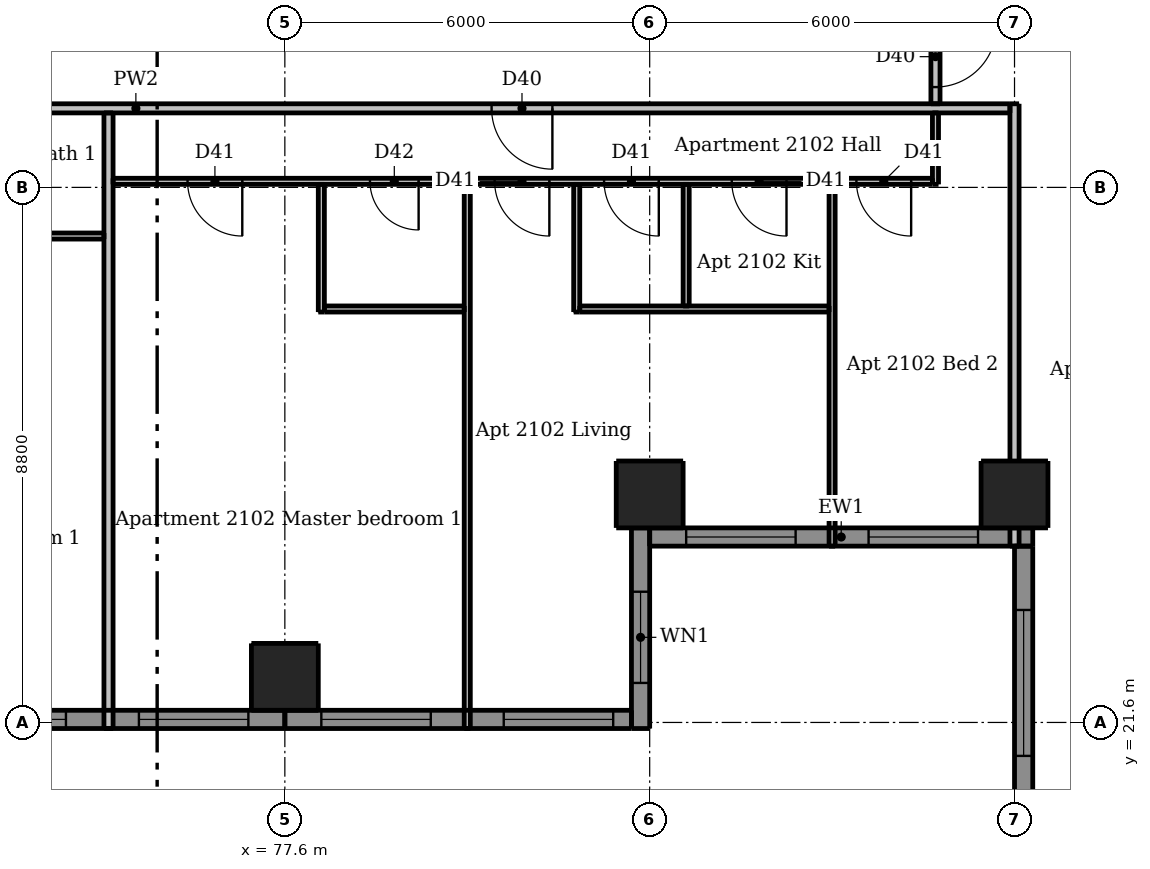
"""IFC4 building model, lengths in metres.
Left out: names, types, materials, properties, quantities, classifications, styles, units other than length and angle.
Written with IfcOpenShell. Run it as: python <this file> out.ifc"""

import sys

from ifc_helpers import new_model, si_unit, direction, frame, frame_2d, origin, origin_2d, place, context, subcontext, project, spatial, rectangle, extrude, element, fill, save


model = new_model("IFC4")
c1 = context("Model", 3, precision=1e-05, world=origin(), true_north=direction((0.0, 1.0)))
c2 = subcontext(c1, "Body", "Model", "MODEL_VIEW")
j1 = project(units=[si_unit("LENGTHUNIT", "METRE"), si_unit("PLANEANGLEUNIT", "RADIAN")], contexts=[c1])
p1 = place(None, origin())
s1 = spatial("IfcSite", under=j1, at=p1, CompositionType="ELEMENT")
p2 = place(p1, origin())
s2 = spatial("IfcBuilding", under=s1, at=p2, CompositionType="ELEMENT")
p3 = place(p2, frame((0.0, 0.0, 82.0)))
s3 = spatial("IfcBuildingStorey", under=s2, at=p3, CompositionType="ELEMENT", Elevation=82.0)
for number, where, z_axis, x_axis in (
    (1, (77.6, 22.35, 0.0), (0.0, 0.0, 1.0), (1.0, 0.0, 0.0)),
    (2, (83.6, 25.35, 0.0), (0.0, 0.0, 1.0), (1.0, 0.0, 0.0)),
    (3, (89.6, 25.35, 0.0), (0.0, 0.0, 1.0), (1.0, 0.0, 0.0)),
):
    element("IfcColumn", number, at=place(p3, frame(where, z_axis=z_axis, x_axis=x_axis)), inside=s3, PredefinedType="COLUMN", context=c2, shape_type="SweptSolid", body=[
        extrude(rectangle(XDim=1.1, YDim=1.1, at=origin_2d()), origin(), (0.0, 0.0, 1.0), 3.05),
    ])
p4 = place(p3, frame((83.45, 21.5, 0.0), z_axis=(0.0, 0.0, 1.0), x_axis=(0.0, 1.0, 0.0)))
e4 = element("IfcWall", 4, at=p4, inside=s3, PredefinedType="SOLIDWALL", context=c2, shape_type="SweptSolid", body=[
    extrude(rectangle(XDim=3.3, YDim=0.3, at=frame_2d((1.65, 0.0))), origin(), (0.0, 0.0, 1.0), 3.05),
])
p5 = place(p4, frame((0.75, 0.0, 0.9)))
e5 = element("IfcOpeningElement", 5, at=p5, cuts=e4, PredefinedType="OPENING", context=c2, shape_type="SweptSolid", body=[
    extrude(rectangle(XDim=1.5, YDim=1.5, at=frame_2d((0.75, 0.75))), frame((0.0, 0.16, 0.0), z_axis=(0.0, -1.0, 0.0), x_axis=(1.0, 0.0, 0.0)), (0.0, 0.0, 1.0), 0.32),
])
p6 = place(p3, frame((89.75, 24.5, 0.0), z_axis=(0.0, 0.0, 1.0), x_axis=(0.0, -1.0, 0.0)))
e6 = element("IfcWall", 6, at=p6, inside=s3, PredefinedType="SOLIDWALL", context=c2, shape_type="SweptSolid", body=[
    extrude(rectangle(XDim=4.5, YDim=0.3, at=frame_2d((2.25, 0.0))), origin(), (0.0, 0.0, 1.0), 3.05),
])
p7 = place(p6, frame((1.05, 0.0, 0.15)))
e7 = element("IfcOpeningElement", 7, at=p7, cuts=e6, PredefinedType="OPENING", context=c2, shape_type="SweptSolid", body=[
    extrude(rectangle(XDim=2.4, YDim=2.1, at=frame_2d((1.2, 1.05))), frame((0.0, 0.16, 0.0), z_axis=(0.0, -1.0, 0.0), x_axis=(1.0, 0.0, 0.0)), (0.0, 0.0, 1.0), 0.32),
])
p8 = place(p3, frame((71.6, 21.65, 0.0), z_axis=(0.0, 0.0, 1.0), x_axis=(1.0, 0.0, 0.0)))
e8 = element("IfcWall", 8, at=p8, inside=s3, PredefinedType="SOLIDWALL", context=c2, shape_type="SweptSolid", body=[
    extrude(rectangle(XDim=6.0, YDim=0.3, at=frame_2d((3.0, 0.0))), origin(), (0.0, 0.0, 1.0), 3.05),
])
p9 = place(p8, frame((0.6, 0.0, 0.15)))
e9 = element("IfcOpeningElement", 9, at=p9, cuts=e8, PredefinedType="OPENING", context=c2, shape_type="SweptSolid", body=[
    extrude(rectangle(XDim=1.8, YDim=2.1, at=frame_2d((0.9, 1.05))), frame((0.0, 0.16, 0.0), z_axis=(0.0, -1.0, 0.0), x_axis=(1.0, 0.0, 0.0)), (0.0, 0.0, 1.0), 0.32),
])
p10 = place(p8, frame((3.6, 0.0, 0.15)))
e10 = element("IfcOpeningElement", 10, at=p10, cuts=e8, PredefinedType="OPENING", context=c2, shape_type="SweptSolid", body=[
    extrude(rectangle(XDim=1.8, YDim=2.1, at=frame_2d((0.9, 1.05))), frame((0.0, 0.16, 0.0), z_axis=(0.0, -1.0, 0.0), x_axis=(1.0, 0.0, 0.0)), (0.0, 0.0, 1.0), 0.32),
])
p11 = place(p3, frame((77.6, 21.65, 0.0), z_axis=(0.0, 0.0, 1.0), x_axis=(1.0, 0.0, 0.0)))
e11 = element("IfcWall", 11, at=p11, inside=s3, PredefinedType="SOLIDWALL", context=c2, shape_type="SweptSolid", body=[
    extrude(rectangle(XDim=5.7, YDim=0.3, at=frame_2d((2.85, 0.0))), origin(), (0.0, 0.0, 1.0), 3.05),
])
p12 = place(p11, frame((0.6, 0.0, 0.15)))
e12 = element("IfcOpeningElement", 12, at=p12, cuts=e11, PredefinedType="OPENING", context=c2, shape_type="SweptSolid", body=[
    extrude(rectangle(XDim=1.8, YDim=2.1, at=frame_2d((0.9, 1.05))), frame((0.0, 0.16, 0.0), z_axis=(0.0, -1.0, 0.0), x_axis=(1.0, 0.0, 0.0)), (0.0, 0.0, 1.0), 0.32),
])
p13 = place(p11, frame((3.6, 0.0, 0.15)))
e13 = element("IfcOpeningElement", 13, at=p13, cuts=e11, PredefinedType="OPENING", context=c2, shape_type="SweptSolid", body=[
    extrude(rectangle(XDim=1.8, YDim=2.1, at=frame_2d((0.9, 1.05))), frame((0.0, 0.16, 0.0), z_axis=(0.0, -1.0, 0.0), x_axis=(1.0, 0.0, 0.0)), (0.0, 0.0, 1.0), 0.32),
])
p14 = place(p3, frame((83.6, 24.65, 0.0), z_axis=(0.0, 0.0, 1.0), x_axis=(1.0, 0.0, 0.0)))
e14 = element("IfcWall", 14, at=p14, inside=s3, PredefinedType="SOLIDWALL", context=c2, shape_type="SweptSolid", body=[
    extrude(rectangle(XDim=6.3, YDim=0.3, at=frame_2d((3.15, 0.0))), origin(), (0.0, 0.0, 1.0), 3.05),
])
p15 = place(p14, frame((0.6, 0.0, 0.15)))
e15 = element("IfcOpeningElement", 15, at=p15, cuts=e14, PredefinedType="OPENING", context=c2, shape_type="SweptSolid", body=[
    extrude(rectangle(XDim=1.8, YDim=2.1, at=frame_2d((0.9, 1.05))), frame((0.0, 0.16, 0.0), z_axis=(0.0, -1.0, 0.0), x_axis=(1.0, 0.0, 0.0)), (0.0, 0.0, 1.0), 0.32),
])
p16 = place(p14, frame((3.6, 0.0, 0.15)))
e16 = element("IfcOpeningElement", 16, at=p16, cuts=e14, PredefinedType="OPENING", context=c2, shape_type="SweptSolid", body=[
    extrude(rectangle(XDim=1.8, YDim=2.1, at=frame_2d((0.9, 1.05))), frame((0.0, 0.16, 0.0), z_axis=(0.0, -1.0, 0.0), x_axis=(1.0, 0.0, 0.0)), (0.0, 0.0, 1.0), 0.32),
])
p17 = place(p3, frame((78.2, 28.35, 0.0), z_axis=(0.0, 0.0, 1.0), x_axis=(0.0, 1.0, 0.0)))
e17 = element("IfcWall", 17, at=p17, inside=s3, PredefinedType="PARTITIONING", context=c2, shape_type="SweptSolid", body=[
    extrude(rectangle(XDim=2.1, YDim=0.1, at=frame_2d((1.05, 0.0))), origin(), (0.0, 0.0, 1.0), 3.05),
])
p18 = place(p3, frame((80.6, 21.5, 0.0), z_axis=(0.0, 0.0, 1.0), x_axis=(0.0, 1.0, 0.0)))
e18 = element("IfcWall", 18, at=p18, inside=s3, PredefinedType="PARTITIONING", context=c2, shape_type="SweptSolid", body=[
    extrude(rectangle(XDim=8.95, YDim=0.1, at=frame_2d((4.475, 0.0))), origin(), (0.0, 0.0, 1.0), 3.05),
])
p19 = place(p3, frame((82.4, 28.35, 0.0), z_axis=(0.0, 0.0, 1.0), x_axis=(0.0, 1.0, 0.0)))
e19 = element("IfcWall", 19, at=p19, inside=s3, PredefinedType="PARTITIONING", context=c2, shape_type="SweptSolid", body=[
    extrude(rectangle(XDim=2.1, YDim=0.1, at=frame_2d((1.05, 0.0))), origin(), (0.0, 0.0, 1.0), 3.05),
])
p20 = place(p3, frame((84.2, 28.45, 0.0), z_axis=(0.0, 0.0, 1.0), x_axis=(0.0, 1.0, 0.0)))
e20 = element("IfcWall", 20, at=p20, inside=s3, PredefinedType="PARTITIONING", context=c2, shape_type="SweptSolid", body=[
    extrude(rectangle(XDim=2.0, YDim=0.1, at=frame_2d((1.0, 0.0))), origin(), (0.0, 0.0, 1.0), 3.05),
])
p21 = place(p3, frame((86.6, 24.5, 0.0), z_axis=(0.0, 0.0, 1.0), x_axis=(0.0, 1.0, 0.0)))
e21 = element("IfcWall", 21, at=p21, inside=s3, PredefinedType="PARTITIONING", context=c2, shape_type="SweptSolid", body=[
    extrude(rectangle(XDim=5.95, YDim=0.1, at=frame_2d((2.975, 0.0))), origin(), (0.0, 0.0, 1.0), 3.05),
])
p22 = place(p3, frame((88.3, 30.45, 0.0), z_axis=(0.0, 0.0, 1.0), x_axis=(0.0, 1.0, 0.0)))
e22 = element("IfcWall", 22, at=p22, inside=s3, PredefinedType="PARTITIONING", context=c2, shape_type="SweptSolid", body=[
    extrude(rectangle(XDim=1.175, YDim=0.1, at=frame_2d((0.587, 0.0))), origin(), (0.0, 0.0, 1.0), 3.05),
])
p23 = place(p3, frame((88.25, 30.5, 0.0), z_axis=(0.0, 0.0, 1.0), x_axis=(-1.0, 0.0, 0.0)))
e23 = element("IfcWall", 23, at=p23, inside=s3, PredefinedType="PARTITIONING", context=c2, shape_type="SweptSolid", body=[
    extrude(rectangle(XDim=13.475, YDim=0.1, at=frame_2d((6.738, 0.0))), origin(), (0.0, 0.0, 1.0), 3.05),
])
p24 = place(p23, frame((6.3, 0.0, 0.0)))
e24 = element("IfcOpeningElement", 24, at=p24, cuts=e23, PredefinedType="OPENING", context=c2, shape_type="SweptSolid", body=[
    extrude(rectangle(XDim=0.9, YDim=2.1, at=frame_2d((0.45, 1.05))), frame((0.0, 0.06, 0.0), z_axis=(0.0, -1.0, 0.0), x_axis=(1.0, 0.0, 0.0)), (0.0, 0.0, 1.0), 0.12),
])
p25 = place(p23, frame((2.4, 0.0, 0.0)))
e25 = element("IfcOpeningElement", 25, at=p25, cuts=e23, PredefinedType="OPENING", context=c2, shape_type="SweptSolid", body=[
    extrude(rectangle(XDim=0.9, YDim=2.1, at=frame_2d((0.45, 1.05))), frame((0.0, 0.06, 0.0), z_axis=(0.0, -1.0, 0.0), x_axis=(1.0, 0.0, 0.0)), (0.0, 0.0, 1.0), 0.12),
])
p26 = place(p23, frame((4.5, 0.0, 0.0)))
e26 = element("IfcOpeningElement", 26, at=p26, cuts=e23, PredefinedType="OPENING", context=c2, shape_type="SweptSolid", body=[
    extrude(rectangle(XDim=0.9, YDim=2.1, at=frame_2d((0.45, 1.05))), frame((0.0, 0.06, 0.0), z_axis=(0.0, -1.0, 0.0), x_axis=(1.0, 0.0, 0.0)), (0.0, 0.0, 1.0), 0.12),
])
p27 = place(p23, frame((11.35, 0.0, 0.0)))
e27 = element("IfcOpeningElement", 27, at=p27, cuts=e23, PredefinedType="OPENING", context=c2, shape_type="SweptSolid", body=[
    extrude(rectangle(XDim=0.9, YDim=2.1, at=frame_2d((0.45, 1.05))), frame((0.0, 0.06, 0.0), z_axis=(0.0, -1.0, 0.0), x_axis=(1.0, 0.0, 0.0)), (0.0, 0.0, 1.0), 0.12),
])
p28 = place(p23, frame((0.35, 0.0, 0.0)))
e28 = element("IfcOpeningElement", 28, at=p28, cuts=e23, PredefinedType="OPENING", context=c2, shape_type="SweptSolid", body=[
    extrude(rectangle(XDim=0.9, YDim=2.1, at=frame_2d((0.45, 1.05))), frame((0.0, 0.06, 0.0), z_axis=(0.0, -1.0, 0.0), x_axis=(1.0, 0.0, 0.0)), (0.0, 0.0, 1.0), 0.12),
])
p29 = place(p23, frame((8.45, 0.0, 0.0)))
e29 = element("IfcOpeningElement", 29, at=p29, cuts=e23, PredefinedType="OPENING", context=c2, shape_type="SweptSolid", body=[
    extrude(rectangle(XDim=0.8, YDim=2.1, at=frame_2d((0.4, 1.05))), frame((0.0, 0.06, 0.0), z_axis=(0.0, -1.0, 0.0), x_axis=(1.0, 0.0, 0.0)), (0.0, 0.0, 1.0), 0.12),
])
p30 = place(p3, frame((68.15, 29.6, 0.0), z_axis=(0.0, 0.0, 1.0), x_axis=(1.0, 0.0, 0.0)))
e30 = element("IfcWall", 30, at=p30, inside=s3, PredefinedType="PARTITIONING", context=c2, shape_type="SweptSolid", body=[
    extrude(rectangle(XDim=6.475, YDim=0.1, at=frame_2d((3.238, 0.0))), origin(), (0.0, 0.0, 1.0), 3.05),
])
p31 = place(p30, frame((4.05, 0.0, 0.0)))
e31 = element("IfcOpeningElement", 31, at=p31, cuts=e30, PredefinedType="OPENING", context=c2, shape_type="SweptSolid", body=[
    extrude(rectangle(XDim=0.8, YDim=2.1, at=frame_2d((0.4, 1.05))), frame((0.0, 0.06, 0.0), z_axis=(0.0, -1.0, 0.0), x_axis=(1.0, 0.0, 0.0)), (0.0, 0.0, 1.0), 0.12),
])
p32 = place(p3, frame((78.25, 28.4, 0.0), z_axis=(0.0, 0.0, 1.0), x_axis=(1.0, 0.0, 0.0)))
e32 = element("IfcWall", 32, at=p32, inside=s3, PredefinedType="PARTITIONING", context=c2, shape_type="SweptSolid", body=[
    extrude(rectangle(XDim=2.3, YDim=0.1, at=frame_2d((1.15, 0.0))), origin(), (0.0, 0.0, 1.0), 3.05),
])
p33 = place(p3, frame((82.45, 28.4, 0.0), z_axis=(0.0, 0.0, 1.0), x_axis=(1.0, 0.0, 0.0)))
e33 = element("IfcWall", 33, at=p33, inside=s3, PredefinedType="PARTITIONING", context=c2, shape_type="SweptSolid", body=[
    extrude(rectangle(XDim=4.1, YDim=0.1, at=frame_2d((2.05, 0.0))), origin(), (0.0, 0.0, 1.0), 3.05),
])
p34 = place(p3, frame((74.7, 21.5, 0.0), z_axis=(0.0, 0.0, 1.0), x_axis=(0.0, 1.0, 0.0)))
e34 = element("IfcWall", 34, at=p34, inside=s3, PredefinedType="PARTITIONING", context=c2, shape_type="SweptSolid", body=[
    extrude(rectangle(XDim=10.125, YDim=0.15, at=frame_2d((5.062, 0.0))), origin(), (0.0, 0.0, 1.0), 3.05),
])
p35 = place(p3, frame((88.3, 60.475, 0.0), z_axis=(0.0, 0.0, 1.0), x_axis=(0.0, -1.0, 0.0)))
e35 = element("IfcWall", 35, at=p35, inside=s3, PredefinedType="PARTITIONING", context=c2, shape_type="SweptSolid", body=[
    extrude(rectangle(XDim=28.7, YDim=0.15, at=frame_2d((14.35, 0.0))), origin(), (0.0, 0.0, 1.0), 3.05),
])
p36 = place(p35, frame((27.425, 0.0, 0.0)))
e36 = element("IfcOpeningElement", 36, at=p36, cuts=e35, PredefinedType="OPENING", context=c2, shape_type="SweptSolid", body=[
    extrude(rectangle(XDim=1.0, YDim=2.1, at=frame_2d((0.5, 1.05))), frame((0.0, 0.085, 0.0), z_axis=(0.0, -1.0, 0.0), x_axis=(1.0, 0.0, 0.0)), (0.0, 0.0, 1.0), 0.17),
])
p37 = place(p35, frame((10.575, 0.0, 0.0)))
e37 = element("IfcOpeningElement", 37, at=p37, cuts=e35, PredefinedType="OPENING", context=c2, shape_type="SweptSolid", body=[
    extrude(rectangle(XDim=1.0, YDim=2.1, at=frame_2d((0.5, 1.05))), frame((0.0, 0.085, 0.0), z_axis=(0.0, -1.0, 0.0), x_axis=(1.0, 0.0, 0.0)), (0.0, 0.0, 1.0), 0.17),
])
p38 = place(p3, frame((89.6, 24.5, 0.0), z_axis=(0.0, 0.0, 1.0), x_axis=(0.0, 1.0, 0.0)))
e38 = element("IfcWall", 38, at=p38, inside=s3, PredefinedType="PARTITIONING", context=c2, shape_type="SweptSolid", body=[
    extrude(rectangle(XDim=7.275, YDim=0.15, at=frame_2d((3.637, 0.0))), origin(), (0.0, 0.0, 1.0), 2.516),
])
p39 = place(p3, frame((89.525, 31.7, 0.0), z_axis=(0.0, 0.0, 1.0), x_axis=(-1.0, 0.0, 0.0)))
e39 = element("IfcWall", 39, at=p39, inside=s3, PredefinedType="PARTITIONING", context=c2, shape_type="SweptSolid", body=[
    extrude(rectangle(XDim=28.75, YDim=0.15, at=frame_2d((14.375, 0.0))), origin(), (0.0, 0.0, 1.0), 3.05),
])
p40 = place(p39, frame((24.625, 0.0, 0.0)))
e40 = element("IfcOpeningElement", 40, at=p40, cuts=e39, PredefinedType="OPENING", context=c2, shape_type="SweptSolid", body=[
    extrude(rectangle(XDim=1.0, YDim=2.1, at=frame_2d((0.5, 1.05))), frame((0.0, 0.085, 0.0), z_axis=(0.0, -1.0, 0.0), x_axis=(1.0, 0.0, 0.0)), (0.0, 0.0, 1.0), 0.17),
])
p41 = place(p39, frame((7.525, 0.0, 0.0)))
e41 = element("IfcOpeningElement", 41, at=p41, cuts=e39, PredefinedType="OPENING", context=c2, shape_type="SweptSolid", body=[
    extrude(rectangle(XDim=1.0, YDim=2.1, at=frame_2d((0.5, 1.05))), frame((0.0, 0.085, 0.0), z_axis=(0.0, -1.0, 0.0), x_axis=(1.0, 0.0, 0.0)), (0.0, 0.0, 1.0), 0.17),
])
p42 = place(p5, origin())
e42 = element("IfcWindow", 42, at=p42, inside=s3, PartitioningType="DOUBLE_PANEL_VERTICAL", PredefinedType="WINDOW", context=c2, shape_type="SweptSolid", body=[
    extrude(rectangle(XDim=1.5, YDim=1.5, at=frame_2d((0.75, 0.75))), frame((0.0, 0.03, 0.0), z_axis=(0.0, -1.0, 0.0), x_axis=(1.0, 0.0, 0.0)), (0.0, 0.0, 1.0), 0.06),
])
fill(e5, e42)
p43 = place(p7, origin())
e43 = element("IfcWindow", 43, at=p43, inside=s3, PartitioningType="DOUBLE_PANEL_VERTICAL", PredefinedType="WINDOW", context=c2, shape_type="SweptSolid", body=[
    extrude(rectangle(XDim=2.4, YDim=2.1, at=frame_2d((1.2, 1.05))), frame((0.0, 0.03, 0.0), z_axis=(0.0, -1.0, 0.0), x_axis=(1.0, 0.0, 0.0)), (0.0, 0.0, 1.0), 0.06),
])
fill(e7, e43)
p44 = place(p9, origin())
e44 = element("IfcWindow", 44, at=p44, inside=s3, PartitioningType="DOUBLE_PANEL_VERTICAL", PredefinedType="WINDOW", context=c2, shape_type="SweptSolid", body=[
    extrude(rectangle(XDim=1.8, YDim=2.1, at=frame_2d((0.9, 1.05))), frame((0.0, 0.03, 0.0), z_axis=(0.0, -1.0, 0.0), x_axis=(1.0, 0.0, 0.0)), (0.0, 0.0, 1.0), 0.06),
])
fill(e9, e44)
p45 = place(p10, origin())
e45 = element("IfcWindow", 45, at=p45, inside=s3, PartitioningType="DOUBLE_PANEL_VERTICAL", PredefinedType="WINDOW", context=c2, shape_type="SweptSolid", body=[
    extrude(rectangle(XDim=1.8, YDim=2.1, at=frame_2d((0.9, 1.05))), frame((0.0, 0.03, 0.0), z_axis=(0.0, -1.0, 0.0), x_axis=(1.0, 0.0, 0.0)), (0.0, 0.0, 1.0), 0.06),
])
fill(e10, e45)
p46 = place(p12, origin())
e46 = element("IfcWindow", 46, at=p46, inside=s3, PartitioningType="DOUBLE_PANEL_VERTICAL", PredefinedType="WINDOW", context=c2, shape_type="SweptSolid", body=[
    extrude(rectangle(XDim=1.8, YDim=2.1, at=frame_2d((0.9, 1.05))), frame((0.0, 0.03, 0.0), z_axis=(0.0, -1.0, 0.0), x_axis=(1.0, 0.0, 0.0)), (0.0, 0.0, 1.0), 0.06),
])
fill(e12, e46)
p47 = place(p13, origin())
e47 = element("IfcWindow", 47, at=p47, inside=s3, PartitioningType="DOUBLE_PANEL_VERTICAL", PredefinedType="WINDOW", context=c2, shape_type="SweptSolid", body=[
    extrude(rectangle(XDim=1.8, YDim=2.1, at=frame_2d((0.9, 1.05))), frame((0.0, 0.03, 0.0), z_axis=(0.0, -1.0, 0.0), x_axis=(1.0, 0.0, 0.0)), (0.0, 0.0, 1.0), 0.06),
])
fill(e13, e47)
p48 = place(p15, origin())
e48 = element("IfcWindow", 48, at=p48, inside=s3, PartitioningType="DOUBLE_PANEL_VERTICAL", PredefinedType="WINDOW", context=c2, shape_type="SweptSolid", body=[
    extrude(rectangle(XDim=1.8, YDim=2.1, at=frame_2d((0.9, 1.05))), frame((0.0, 0.03, 0.0), z_axis=(0.0, -1.0, 0.0), x_axis=(1.0, 0.0, 0.0)), (0.0, 0.0, 1.0), 0.06),
])
fill(e15, e48)
p49 = place(p16, origin())
e49 = element("IfcWindow", 49, at=p49, inside=s3, PartitioningType="DOUBLE_PANEL_VERTICAL", PredefinedType="WINDOW", context=c2, shape_type="SweptSolid", body=[
    extrude(rectangle(XDim=1.8, YDim=2.1, at=frame_2d((0.9, 1.05))), frame((0.0, 0.03, 0.0), z_axis=(0.0, -1.0, 0.0), x_axis=(1.0, 0.0, 0.0)), (0.0, 0.0, 1.0), 0.06),
])
fill(e16, e49)
p50 = place(p41, origin())
e50 = element("IfcDoor", 50, at=p50, inside=s3, OperationType="SINGLE_SWING_LEFT", PredefinedType="DOOR", context=c2, shape_type="SweptSolid", body=[
    extrude(rectangle(XDim=1.0, YDim=2.1, at=frame_2d((0.5, 1.05))), frame((0.0, 0.025, 0.0), z_axis=(0.0, -1.0, 0.0), x_axis=(1.0, 0.0, 0.0)), (0.0, 0.0, 1.0), 0.05),
])
fill(e41, e50)
p51 = place(p24, origin())
e51 = element("IfcDoor", 51, at=p51, inside=s3, OperationType="SINGLE_SWING_LEFT", PredefinedType="DOOR", context=c2, shape_type="SweptSolid", body=[
    extrude(rectangle(XDim=0.9, YDim=2.1, at=frame_2d((0.45, 1.05))), frame((0.0, 0.025, 0.0), z_axis=(0.0, -1.0, 0.0), x_axis=(1.0, 0.0, 0.0)), (0.0, 0.0, 1.0), 0.05),
])
fill(e24, e51)
p52 = place(p25, origin())
e52 = element("IfcDoor", 52, at=p52, inside=s3, OperationType="SINGLE_SWING_LEFT", PredefinedType="DOOR", context=c2, shape_type="SweptSolid", body=[
    extrude(rectangle(XDim=0.9, YDim=2.1, at=frame_2d((0.45, 1.05))), frame((0.0, 0.025, 0.0), z_axis=(0.0, -1.0, 0.0), x_axis=(1.0, 0.0, 0.0)), (0.0, 0.0, 1.0), 0.05),
])
fill(e25, e52)
p53 = place(p26, origin())
e53 = element("IfcDoor", 53, at=p53, inside=s3, OperationType="SINGLE_SWING_LEFT", PredefinedType="DOOR", context=c2, shape_type="SweptSolid", body=[
    extrude(rectangle(XDim=0.9, YDim=2.1, at=frame_2d((0.45, 1.05))), frame((0.0, 0.025, 0.0), z_axis=(0.0, -1.0, 0.0), x_axis=(1.0, 0.0, 0.0)), (0.0, 0.0, 1.0), 0.05),
])
fill(e26, e53)
p54 = place(p27, origin())
e54 = element("IfcDoor", 54, at=p54, inside=s3, OperationType="SINGLE_SWING_LEFT", PredefinedType="DOOR", context=c2, shape_type="SweptSolid", body=[
    extrude(rectangle(XDim=0.9, YDim=2.1, at=frame_2d((0.45, 1.05))), frame((0.0, 0.025, 0.0), z_axis=(0.0, -1.0, 0.0), x_axis=(1.0, 0.0, 0.0)), (0.0, 0.0, 1.0), 0.05),
])
fill(e27, e54)
p55 = place(p28, origin())
e55 = element("IfcDoor", 55, at=p55, inside=s3, OperationType="SINGLE_SWING_LEFT", PredefinedType="DOOR", context=c2, shape_type="SweptSolid", body=[
    extrude(rectangle(XDim=0.9, YDim=2.1, at=frame_2d((0.45, 1.05))), frame((0.0, 0.025, 0.0), z_axis=(0.0, -1.0, 0.0), x_axis=(1.0, 0.0, 0.0)), (0.0, 0.0, 1.0), 0.05),
])
fill(e28, e55)
p56 = place(p29, origin())
e56 = element("IfcDoor", 56, at=p56, inside=s3, OperationType="SINGLE_SWING_LEFT", PredefinedType="DOOR", context=c2, shape_type="SweptSolid", body=[
    extrude(rectangle(XDim=0.8, YDim=2.1, at=frame_2d((0.4, 1.05))), frame((0.0, 0.025, 0.0), z_axis=(0.0, -1.0, 0.0), x_axis=(1.0, 0.0, 0.0)), (0.0, 0.0, 1.0), 0.05),
])
fill(e29, e56)
p57 = place(p36, origin())
e57 = element("IfcDoor", 57, at=p57, inside=s3, OperationType="SINGLE_SWING_LEFT", PredefinedType="DOOR", context=c2, shape_type="SweptSolid", body=[
    extrude(rectangle(XDim=1.0, YDim=2.1, at=frame_2d((0.5, 1.05))), frame((0.0, 0.025, 0.0), z_axis=(0.0, -1.0, 0.0), x_axis=(1.0, 0.0, 0.0)), (0.0, 0.0, 1.0), 0.05),
])
fill(e36, e57)
save(model, sys.argv[1])
